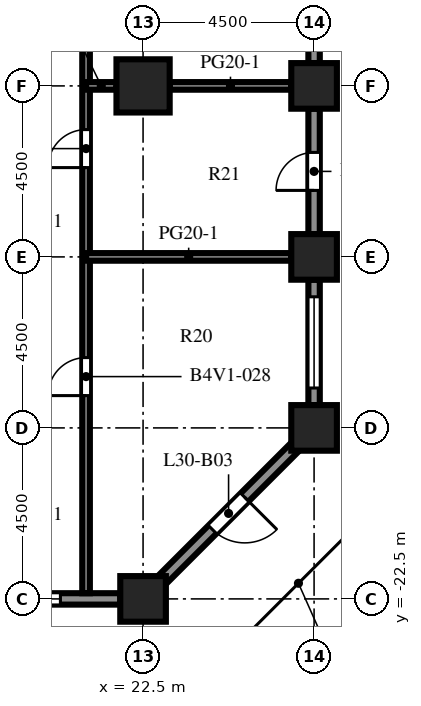
"""IFC4 building model, lengths in metres.
Left out: names, types, materials, properties, quantities, classifications, styles, units other than length and angle.
Written with IfcOpenShell. Run it as: python <this file> out.ifc"""

import sys

from ifc_helpers import new_model, si_unit, direction, frame, frame_2d, origin, origin_2d, place, context, subcontext, project, spatial, rectangle, extrude, element, fill, save


model = new_model("IFC4")
c1 = context("Model", 3, precision=1e-05, world=origin(), true_north=direction((0.0, 1.0)))
c2 = subcontext(c1, "Body", "Model", "MODEL_VIEW")
j1 = project(units=[si_unit("LENGTHUNIT", "METRE"), si_unit("PLANEANGLEUNIT", "RADIAN")], contexts=[c1])
p1 = place(None, origin())
s1 = spatial("IfcSite", under=j1, at=p1, CompositionType="ELEMENT")
p2 = place(p1, origin())
s2 = spatial("IfcBuilding", under=s1, at=p2, CompositionType="ELEMENT")
p3 = place(p2, frame((0.0, 0.0, 133.1)))
s3 = spatial("IfcBuildingStorey", under=s2, at=p3, CompositionType="ELEMENT", Elevation=133.1)
for number, where, z_axis, x_axis in (
    (1, (22.5, -22.5, 0.0), (0.0, 0.0, 1.0), (1.0, 0.0, 0.0)),
    (2, (27.0, -18.0, 0.0), (0.0, 0.0, 1.0), (1.0, 0.0, 0.0)),
    (3, (27.0, -13.5, 0.0), (0.0, 0.0, 1.0), (1.0, 0.0, 0.0)),
    (4, (27.0, -9.0, 0.0), (0.0, 0.0, 1.0), (1.0, 0.0, 0.0)),
):
    element("IfcColumn", number, at=place(p3, frame(where, z_axis=z_axis, x_axis=x_axis)), inside=s3, PredefinedType="COLUMN", context=c2, shape_type="SweptSolid", body=[
        extrude(rectangle(XDim=1.2, YDim=1.2, at=origin_2d()), origin(), (0.0, 0.0, 1.0), 4.1),
    ])
p4 = place(p3, frame((22.5, -9.0, 0.0), z_axis=(0.0, 0.0, 1.0), x_axis=(1.0, 0.0, 0.0)))
e5 = element("IfcColumn", 5, at=p4, inside=s3, PredefinedType="COLUMN", context=c2, shape_type="SweptSolid", body=[
    extrude(rectangle(XDim=1.4, YDim=1.4, at=origin_2d()), origin(), (0.0, 0.0, 1.0), 4.1),
])
p5 = place(p3, frame((21.9, -22.5, 0.0), z_axis=(0.0, 0.0, 1.0), x_axis=(-1.0, 0.0, 0.0)))
e6 = element("IfcWall", 6, at=p5, inside=s3, PredefinedType="SOLIDWALL", context=c2, shape_type="SweptSolid", body=[
    extrude(rectangle(XDim=3.3, YDim=0.3, at=frame_2d((1.65, 0.0))), origin(), (0.0, 0.0, 1.0), 2.75),
])
p6 = place(p5, frame((1.575, 0.0, 0.8)))
e7 = element("IfcOpeningElement", 7, at=p6, cuts=e6, PredefinedType="OPENING", context=c2, shape_type="SweptSolid", body=[
    extrude(rectangle(XDim=1.2, YDim=1.7, at=frame_2d((0.6, 0.85))), frame((0.0, 0.16, 0.0), z_axis=(0.0, -1.0, 0.0), x_axis=(1.0, 0.0, 0.0)), (0.0, 0.0, 1.0), 0.32),
])
p7 = place(p3, frame((26.506, -18.494, 0.0), z_axis=(0.0, 0.0, 1.0), x_axis=(-0.707106781187, -0.707106781187, 0.0)))
e8 = element("IfcWall", 8, at=p7, inside=s3, PredefinedType="SOLIDWALL", context=c2, shape_type="SweptSolid", body=[
    extrude(rectangle(XDim=4.967, YDim=0.3, at=frame_2d((2.483, 0.0))), origin(), (0.0, 0.0, 1.0), 2.75),
])
p8 = place(p7, frame((1.884, 0.0, 0.0)))
e9 = element("IfcOpeningElement", 9, at=p8, cuts=e8, PredefinedType="OPENING", context=c2, shape_type="SweptSolid", body=[
    extrude(rectangle(XDim=1.2, YDim=2.2, at=frame_2d((0.6, 1.1))), frame((0.0, 0.16, 0.0), z_axis=(0.0, -1.0, 0.0), x_axis=(1.0, 0.0, 0.0)), (0.0, 0.0, 1.0), 0.32),
])
p9 = place(p3, frame((27.0, -14.1, 0.0), z_axis=(0.0, 0.0, 1.0), x_axis=(0.0, -1.0, 0.0)))
e10 = element("IfcWall", 10, at=p9, inside=s3, PredefinedType="SOLIDWALL", context=c2, shape_type="SweptSolid", body=[
    extrude(rectangle(XDim=3.3, YDim=0.3, at=frame_2d((1.65, 0.0))), origin(), (0.0, 0.0, 1.0), 2.75),
])
p10 = place(p9, frame((0.45, 0.0, 0.8)))
e11 = element("IfcOpeningElement", 11, at=p10, cuts=e10, PredefinedType="OPENING", context=c2, shape_type="SweptSolid", body=[
    extrude(rectangle(XDim=2.4, YDim=1.7, at=frame_2d((1.2, 0.85))), frame((0.0, 0.16, 0.0), z_axis=(0.0, -1.0, 0.0), x_axis=(1.0, 0.0, 0.0)), (0.0, 0.0, 1.0), 0.32),
])
p11 = place(p3, frame((27.0, -9.6, 0.0), z_axis=(0.0, 0.0, 1.0), x_axis=(0.0, -1.0, 0.0)))
e12 = element("IfcWall", 12, at=p11, inside=s3, PredefinedType="SOLIDWALL", context=c2, shape_type="SweptSolid", body=[
    extrude(rectangle(XDim=3.3, YDim=0.3, at=frame_2d((1.65, 0.0))), origin(), (0.0, 0.0, 1.0), 2.75),
])
p12 = place(p11, frame((1.15, 0.0, 0.0)))
e13 = element("IfcOpeningElement", 13, at=p12, cuts=e12, PredefinedType="OPENING", context=c2, shape_type="SweptSolid", body=[
    extrude(rectangle(XDim=1.0, YDim=2.2, at=frame_2d((0.5, 1.1))), frame((0.0, 0.16, 0.0), z_axis=(0.0, -1.0, 0.0), x_axis=(1.0, 0.0, 0.0)), (0.0, 0.0, 1.0), 0.32),
])
p13 = place(p3, frame((27.0, -5.1, 0.0), z_axis=(0.0, 0.0, 1.0), x_axis=(0.0, -1.0, 0.0)))
e14 = element("IfcWall", 14, at=p13, inside=s3, PredefinedType="SOLIDWALL", context=c2, shape_type="SweptSolid", body=[
    extrude(rectangle(XDim=3.3, YDim=0.3, at=frame_2d((1.65, 0.0))), origin(), (0.0, 0.0, 1.0), 2.75),
])
p14 = place(p13, frame((0.45, 0.0, 0.8)))
e15 = element("IfcOpeningElement", 15, at=p14, cuts=e14, PredefinedType="OPENING", context=c2, shape_type="SweptSolid", body=[
    extrude(rectangle(XDim=2.4, YDim=1.7, at=frame_2d((1.2, 0.85))), frame((0.0, 0.16, 0.0), z_axis=(0.0, -1.0, 0.0), x_axis=(1.0, 0.0, 0.0)), (0.0, 0.0, 1.0), 0.32),
])
p15 = place(p3, frame((21.0, 31.35, 0.0), z_axis=(0.0, 0.0, 1.0), x_axis=(0.0, -1.0, 0.0)))
e16 = element("IfcWall", 16, at=p15, inside=s3, PredefinedType="PARTITIONING", context=c2, shape_type="SweptSolid", body=[
    extrude(rectangle(XDim=53.7, YDim=0.2, at=frame_2d((26.85, 0.0))), origin(), (0.0, 0.0, 1.0), 3.65),
])
p16 = place(p15, frame((47.5, 0.0, 0.0)))
e17 = element("IfcOpeningElement", 17, at=p16, cuts=e16, PredefinedType="OPENING", context=c2, shape_type="SweptSolid", body=[
    extrude(rectangle(XDim=1.0, YDim=2.1, at=frame_2d((0.5, 1.05))), frame((0.0, 0.11, 0.0), z_axis=(0.0, -1.0, 0.0), x_axis=(1.0, 0.0, 0.0)), (0.0, 0.0, 1.0), 0.22),
])
p17 = place(p15, frame((41.5, 0.0, 0.0)))
e18 = element("IfcOpeningElement", 18, at=p17, cuts=e16, PredefinedType="OPENING", context=c2, shape_type="SweptSolid", body=[
    extrude(rectangle(XDim=1.0, YDim=2.1, at=frame_2d((0.5, 1.05))), frame((0.0, 0.11, 0.0), z_axis=(0.0, -1.0, 0.0), x_axis=(1.0, 0.0, 0.0)), (0.0, 0.0, 1.0), 0.22),
])
p18 = place(p15, frame((33.5, 0.0, 0.0)))
e19 = element("IfcOpeningElement", 19, at=p18, cuts=e16, PredefinedType="OPENING", context=c2, shape_type="SweptSolid", body=[
    extrude(rectangle(XDim=1.0, YDim=2.1, at=frame_2d((0.5, 1.05))), frame((0.0, 0.11, 0.0), z_axis=(0.0, -1.0, 0.0), x_axis=(1.0, 0.0, 0.0)), (0.0, 0.0, 1.0), 0.22),
])
p19 = place(p15, frame((23.75, 0.0, 0.0)))
e20 = element("IfcOpeningElement", 20, at=p19, cuts=e16, PredefinedType="OPENING", context=c2, shape_type="SweptSolid", body=[
    extrude(rectangle(XDim=1.0, YDim=2.1, at=frame_2d((0.5, 1.05))), frame((0.0, 0.11, 0.0), z_axis=(0.0, -1.0, 0.0), x_axis=(1.0, 0.0, 0.0)), (0.0, 0.0, 1.0), 0.22),
])
p20 = place(p15, frame((16.25, 0.0, 0.0)))
e21 = element("IfcOpeningElement", 21, at=p20, cuts=e16, PredefinedType="OPENING", context=c2, shape_type="SweptSolid", body=[
    extrude(rectangle(XDim=1.0, YDim=2.1, at=frame_2d((0.5, 1.05))), frame((0.0, 0.11, 0.0), z_axis=(0.0, -1.0, 0.0), x_axis=(1.0, 0.0, 0.0)), (0.0, 0.0, 1.0), 0.22),
])
p21 = place(p15, frame((11.0, 0.0, 0.0)))
e22 = element("IfcOpeningElement", 22, at=p21, cuts=e16, PredefinedType="OPENING", context=c2, shape_type="SweptSolid", body=[
    extrude(rectangle(XDim=1.0, YDim=2.1, at=frame_2d((0.5, 1.05))), frame((0.0, 0.11, 0.0), z_axis=(0.0, -1.0, 0.0), x_axis=(1.0, 0.0, 0.0)), (0.0, 0.0, 1.0), 0.22),
])
p22 = place(p15, frame((6.75, 0.0, 0.0)))
e23 = element("IfcOpeningElement", 23, at=p22, cuts=e16, PredefinedType="OPENING", context=c2, shape_type="SweptSolid", body=[
    extrude(rectangle(XDim=1.0, YDim=2.1, at=frame_2d((0.5, 1.05))), frame((0.0, 0.11, 0.0), z_axis=(0.0, -1.0, 0.0), x_axis=(1.0, 0.0, 0.0)), (0.0, 0.0, 1.0), 0.22),
])
p23 = place(p15, frame((2.0, 0.0, 0.0)))
e24 = element("IfcOpeningElement", 24, at=p23, cuts=e16, PredefinedType="OPENING", context=c2, shape_type="SweptSolid", body=[
    extrude(rectangle(XDim=1.0, YDim=2.1, at=frame_2d((0.5, 1.05))), frame((0.0, 0.11, 0.0), z_axis=(0.0, -1.0, 0.0), x_axis=(1.0, 0.0, 0.0)), (0.0, 0.0, 1.0), 0.22),
])
p24 = place(p3, frame((21.0, -13.5, 0.0), z_axis=(0.0, 0.0, 1.0), x_axis=(1.0, 0.0, 0.0)))
e25 = element("IfcWall", 25, at=p24, inside=s3, PredefinedType="PARTITIONING", context=c2, shape_type="SweptSolid", body=[
    extrude(rectangle(XDim=5.4, YDim=0.2, at=frame_2d((2.7, 0.0))), origin(), (0.0, 0.0, 1.0), 3.65),
])
p25 = place(p3, frame((21.0, -9.0, 0.0), z_axis=(0.0, 0.0, 1.0), x_axis=(1.0, 0.0, 0.0)))
e26 = element("IfcWall", 26, at=p25, inside=s3, PredefinedType="PARTITIONING", context=c2, shape_type="SweptSolid", body=[
    extrude(rectangle(XDim=0.8, YDim=0.2, at=frame_2d((0.4, 0.0))), origin(), (0.0, 0.0, 1.0), 3.65),
])
p26 = place(p3, frame((23.2, -9.0, 0.0), z_axis=(0.0, 0.0, 1.0), x_axis=(1.0, 0.0, 0.0)))
e27 = element("IfcWall", 27, at=p26, inside=s3, PredefinedType="PARTITIONING", context=c2, shape_type="SweptSolid", body=[
    extrude(rectangle(XDim=3.2, YDim=0.2, at=frame_2d((1.6, 0.0))), origin(), (0.0, 0.0, 1.0), 3.65),
])
p27 = place(p6, origin())
e28 = element("IfcWindow", 28, at=p27, inside=s3, PartitioningType="SINGLE_PANEL", PredefinedType="WINDOW", context=c2, shape_type="SweptSolid", body=[
    extrude(rectangle(XDim=1.2, YDim=1.7, at=frame_2d((0.6, 0.85))), frame((0.0, 0.03, 0.0), z_axis=(0.0, -1.0, 0.0), x_axis=(1.0, 0.0, 0.0)), (0.0, 0.0, 1.0), 0.06),
])
fill(e7, e28)
p28 = place(p8, origin())
e29 = element("IfcDoor", 29, at=p28, inside=s3, OperationType="SINGLE_SWING_LEFT", PredefinedType="DOOR", context=c2, shape_type="SweptSolid", body=[
    extrude(rectangle(XDim=1.2, YDim=2.2, at=frame_2d((0.6, 1.1))), frame((0.0, 0.025, 0.0), z_axis=(0.0, -1.0, 0.0), x_axis=(1.0, 0.0, 0.0)), (0.0, 0.0, 1.0), 0.05),
])
fill(e9, e29)
p29 = place(p10, origin())
e30 = element("IfcWindow", 30, at=p29, inside=s3, PartitioningType="SINGLE_PANEL", PredefinedType="WINDOW", context=c2, shape_type="SweptSolid", body=[
    extrude(rectangle(XDim=2.4, YDim=1.7, at=frame_2d((1.2, 0.85))), frame((0.0, 0.03, 0.0), z_axis=(0.0, -1.0, 0.0), x_axis=(1.0, 0.0, 0.0)), (0.0, 0.0, 1.0), 0.06),
])
fill(e11, e30)
p30 = place(p12, origin())
e31 = element("IfcDoor", 31, at=p30, inside=s3, OperationType="SINGLE_SWING_RIGHT", PredefinedType="DOOR", context=c2, shape_type="SweptSolid", body=[
    extrude(rectangle(XDim=1.0, YDim=2.2, at=frame_2d((0.5, 1.1))), frame((0.0, 0.025, 0.0), z_axis=(0.0, -1.0, 0.0), x_axis=(1.0, 0.0, 0.0)), (0.0, 0.0, 1.0), 0.05),
])
fill(e13, e31)
p31 = place(p16, origin())
e32 = element("IfcDoor", 32, at=p31, inside=s3, OperationType="SINGLE_SWING_RIGHT", PredefinedType="DOOR", context=c2, shape_type="SweptSolid", body=[
    extrude(rectangle(XDim=1.0, YDim=2.1, at=frame_2d((0.5, 1.05))), frame((0.0, 0.025, 0.0), z_axis=(0.0, -1.0, 0.0), x_axis=(1.0, 0.0, 0.0)), (0.0, 0.0, 1.0), 0.05),
])
fill(e17, e32)
p32 = place(p17, origin())
e33 = element("IfcDoor", 33, at=p32, inside=s3, OperationType="SINGLE_SWING_RIGHT", PredefinedType="DOOR", context=c2, shape_type="SweptSolid", body=[
    extrude(rectangle(XDim=1.0, YDim=2.1, at=frame_2d((0.5, 1.05))), frame((0.0, 0.025, 0.0), z_axis=(0.0, -1.0, 0.0), x_axis=(1.0, 0.0, 0.0)), (0.0, 0.0, 1.0), 0.05),
])
fill(e18, e33)
save(model, sys.argv[1])
